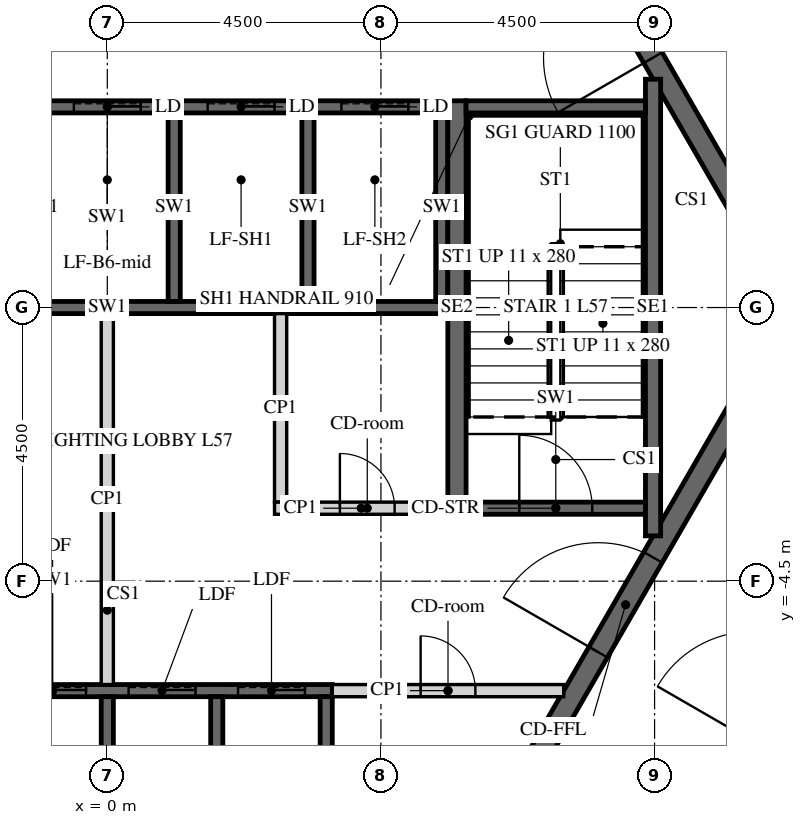
"""IFC4 building model, lengths in metres.
Left out: names, types, materials, properties, quantities, classifications, styles, units other than length and angle.
Written with IfcOpenShell. Run it as: python <this file> out.ifc"""

import sys

from ifc_helpers import new_model, si_unit, direction, frame, frame_2d, origin, place, context, subcontext, project, spatial, polyline, rectangle, outline, extrude, element, fill, save


model = new_model("IFC4")
c1 = context("Model", 3, precision=1e-05, world=origin(), true_north=direction((0.0, 1.0)))
c2 = subcontext(c1, "Body", "Model", "MODEL_VIEW")
j1 = project(units=[si_unit("LENGTHUNIT", "METRE"), si_unit("PLANEANGLEUNIT", "RADIAN")], contexts=[c1])
p1 = place(None, origin())
s1 = spatial("IfcSite", under=j1, at=p1, CompositionType="ELEMENT")
p2 = place(p1, origin())
s2 = spatial("IfcBuilding", under=s1, at=p2, CompositionType="ELEMENT")
p3 = place(p2, frame((0.0, 0.0, 238.5)))
s3 = spatial("IfcBuildingStorey", under=s2, at=p3, CompositionType="ELEMENT", Elevation=238.5)
p4 = place(p3, frame((7.361, -12.75, -0.15), z_axis=(0.0, 0.0, 1.0), x_axis=(0.50000571537, 0.866022103989, 0.0)))
e1 = element("IfcWall", 1, at=p4, inside=s3, PredefinedType="SHEAR", context=c2, shape_type="SweptSolid", body=[
    extrude(outline(polyline([(-0.144, -0.25), (14.867, -0.25), (14.578, 0.25), (0.144, 0.25), (-0.144, -0.25)])), origin(), (0.0, 0.0, 1.0), 3.9),
])
p5 = place(p4, frame((6.49, 0.0, 0.15)))
e2 = element("IfcOpeningElement", 2, at=p5, cuts=e1, PredefinedType="OPENING", context=c2, shape_type="SweptSolid", body=[
    extrude(rectangle(XDim=1.8, YDim=2.4, at=frame_2d((0.9, 1.2))), frame((0.0, 0.26, 0.0), z_axis=(0.0, -1.0, 0.0), x_axis=(1.0, 0.0, 0.0)), (0.0, 0.0, 1.0), 0.52),
])
p6 = place(p3, frame((14.722, 0.0, -0.15), z_axis=(0.0, 0.0, 1.0), x_axis=(-0.50000571537, 0.866022103989, 0.0)))
e3 = element("IfcWall", 3, at=p6, inside=s3, PredefinedType="SHEAR", context=c2, shape_type="SweptSolid", body=[
    extrude(outline(polyline([(-0.144, -0.25), (14.867, -0.25), (14.578, 0.25), (0.144, 0.25), (-0.144, -0.25)])), origin(), (0.0, 0.0, 1.0), 3.9),
])
p7 = place(p6, frame((6.432, 0.0, 0.15)))
e4 = element("IfcOpeningElement", 4, at=p7, cuts=e3, PredefinedType="OPENING", context=c2, shape_type="SweptSolid", body=[
    extrude(rectangle(XDim=1.8, YDim=2.4, at=frame_2d((0.9, 1.2))), frame((0.0, 0.26, 0.0), z_axis=(0.0, -1.0, 0.0), x_axis=(1.0, 0.0, 0.0)), (0.0, 0.0, 1.0), 0.52),
])
p8 = place(p3, frame((5.673, -9.825, -0.15), z_axis=(0.0, 0.0, 1.0), x_axis=(0.499995046907, 0.866028263435, 0.0)))
e5 = element("IfcWall", 5, at=p8, inside=s3, PredefinedType="SHEAR", context=c2, shape_type="SweptSolid", body=[
    extrude(outline(polyline([(-0.101, -0.175), (11.446, -0.175), (11.244, 0.175), (0.101, 0.175), (-0.101, -0.175)])), origin(), (0.0, 0.0, 1.0), 3.9),
])
p9 = place(p8, frame((4.801, 0.0, 0.15)))
e6 = element("IfcOpeningElement", 6, at=p9, cuts=e5, PredefinedType="OPENING", context=c2, shape_type="SweptSolid", body=[
    extrude(rectangle(XDim=1.8, YDim=2.4, at=frame_2d((0.9, 1.2))), frame((0.0, 0.185, 0.0), z_axis=(0.0, -1.0, 0.0), x_axis=(1.0, 0.0, 0.0)), (0.0, 0.0, 1.0), 0.37),
])
p10 = place(p3, frame((11.345, 0.0, -0.15), z_axis=(0.0, 0.0, 1.0), x_axis=(-0.499995046907, 0.866028263435, 0.0)))
e7 = element("IfcWall", 7, at=p10, inside=s3, PredefinedType="SHEAR", context=c2, shape_type="SweptSolid", body=[
    extrude(outline(polyline([(-0.101, -0.175), (11.446, -0.175), (11.244, 0.175), (0.101, 0.175), (-0.101, -0.175)])), origin(), (0.0, 0.0, 1.0), 3.9),
])
p11 = place(p10, frame((4.744, 0.0, 0.15)))
e8 = element("IfcOpeningElement", 8, at=p11, cuts=e7, PredefinedType="OPENING", context=c2, shape_type="SweptSolid", body=[
    extrude(rectangle(XDim=1.8, YDim=2.4, at=frame_2d((0.9, 1.2))), frame((0.0, 0.185, 0.0), z_axis=(0.0, -1.0, 0.0), x_axis=(1.0, 0.0, 0.0)), (0.0, 0.0, 1.0), 0.37),
])
p12 = place(p3, frame((-5.6, 3.3, -0.25), z_axis=(0.0, 0.0, 1.0), x_axis=(1.0, 0.0, 0.0)))
e9 = element("IfcWall", 9, at=p12, inside=s3, PredefinedType="SHEAR", context=c2, shape_type="SweptSolid", body=[
    extrude(rectangle(XDim=11.2, YDim=0.2, at=frame_2d((5.6, 0.0))), origin(), (0.0, 0.0, 1.0), 3.9),
])
p13 = place(p12, frame((0.65, 0.0, 0.25)))
e10 = element("IfcOpeningElement", 10, at=p13, cuts=e9, PredefinedType="OPENING", context=c2, shape_type="SweptSolid", body=[
    extrude(rectangle(XDim=1.1, YDim=2.1, at=frame_2d((0.55, 1.05))), frame((0.0, 0.11, 0.0), z_axis=(0.0, -1.0, 0.0), x_axis=(1.0, 0.0, 0.0)), (0.0, 0.0, 1.0), 0.22),
])
p14 = place(p12, frame((2.85, 0.0, 0.25)))
e11 = element("IfcOpeningElement", 11, at=p14, cuts=e9, PredefinedType="OPENING", context=c2, shape_type="SweptSolid", body=[
    extrude(rectangle(XDim=1.1, YDim=2.1, at=frame_2d((0.55, 1.05))), frame((0.0, 0.11, 0.0), z_axis=(0.0, -1.0, 0.0), x_axis=(1.0, 0.0, 0.0)), (0.0, 0.0, 1.0), 0.22),
])
p15 = place(p12, frame((5.05, 0.0, 0.25)))
e12 = element("IfcOpeningElement", 12, at=p15, cuts=e9, PredefinedType="OPENING", context=c2, shape_type="SweptSolid", body=[
    extrude(rectangle(XDim=1.1, YDim=2.1, at=frame_2d((0.55, 1.05))), frame((0.0, 0.11, 0.0), z_axis=(0.0, -1.0, 0.0), x_axis=(1.0, 0.0, 0.0)), (0.0, 0.0, 1.0), 0.22),
])
p16 = place(p12, frame((7.25, 0.0, 0.25)))
e13 = element("IfcOpeningElement", 13, at=p16, cuts=e9, PredefinedType="OPENING", context=c2, shape_type="SweptSolid", body=[
    extrude(rectangle(XDim=1.1, YDim=2.1, at=frame_2d((0.55, 1.05))), frame((0.0, 0.11, 0.0), z_axis=(0.0, -1.0, 0.0), x_axis=(1.0, 0.0, 0.0)), (0.0, 0.0, 1.0), 0.22),
])
p17 = place(p12, frame((9.45, 0.0, 0.25)))
e14 = element("IfcOpeningElement", 14, at=p17, cuts=e9, PredefinedType="OPENING", context=c2, shape_type="SweptSolid", body=[
    extrude(rectangle(XDim=1.1, YDim=2.1, at=frame_2d((0.55, 1.05))), frame((0.0, 0.11, 0.0), z_axis=(0.0, -1.0, 0.0), x_axis=(1.0, 0.0, 0.0)), (0.0, 0.0, 1.0), 0.22),
])
p18 = place(p3, frame((-5.6, 0.0, -0.25), z_axis=(0.0, 0.0, 1.0), x_axis=(1.0, 0.0, 0.0)))
e15 = element("IfcWall", 15, at=p18, inside=s3, PredefinedType="SHEAR", context=c2, shape_type="SweptSolid", body=[
    extrude(rectangle(XDim=11.2, YDim=0.2, at=frame_2d((5.6, 0.0))), origin(), (0.0, 0.0, 1.0), 3.9),
])
for number, where, z_axis, x_axis in (
    (16, (1.1, 0.1, -0.25), (0.0, 0.0, 1.0), (0.0, 1.0, 0.0)),
    (17, (3.3, 0.1, -0.25), (0.0, 0.0, 1.0), (0.0, 1.0, 0.0)),
    (18, (5.5, 0.1, -0.25), (0.0, 0.0, 1.0), (0.0, 1.0, 0.0)),
):
    element("IfcWall", number, at=place(p3, frame(where, z_axis=z_axis, x_axis=x_axis)), inside=s3, PredefinedType="SHEAR", context=c2, shape_type="SweptSolid", body=[
        extrude(rectangle(XDim=3.1, YDim=0.2, at=frame_2d((1.55, 0.0))), origin(), (0.0, 0.0, 1.0), 3.9),
    ])
p19 = place(p3, frame((-5.5, -6.3, -0.25), z_axis=(0.0, 0.0, 1.0), x_axis=(1.0, 0.0, 0.0)))
e19 = element("IfcWall", 19, at=p19, inside=s3, PredefinedType="SHEAR", context=c2, shape_type="SweptSolid", body=[
    extrude(rectangle(XDim=9.2, YDim=0.2, at=frame_2d((4.6, 0.0))), origin(), (0.0, 0.0, 1.0), 3.9),
])
p20 = place(p19, frame((0.45, 0.0, 0.25)))
e20 = element("IfcOpeningElement", 20, at=p20, cuts=e19, PredefinedType="OPENING", context=c2, shape_type="SweptSolid", body=[
    extrude(rectangle(XDim=1.1, YDim=2.1, at=frame_2d((0.55, 1.05))), frame((0.0, 0.11, 0.0), z_axis=(0.0, -1.0, 0.0), x_axis=(1.0, 0.0, 0.0)), (0.0, 0.0, 1.0), 0.22),
])
p21 = place(p19, frame((2.25, 0.0, 0.25)))
e21 = element("IfcOpeningElement", 21, at=p21, cuts=e19, PredefinedType="OPENING", context=c2, shape_type="SweptSolid", body=[
    extrude(rectangle(XDim=1.1, YDim=2.1, at=frame_2d((0.55, 1.05))), frame((0.0, 0.11, 0.0), z_axis=(0.0, -1.0, 0.0), x_axis=(1.0, 0.0, 0.0)), (0.0, 0.0, 1.0), 0.22),
])
p22 = place(p19, frame((4.05, 0.0, 0.25)))
e22 = element("IfcOpeningElement", 22, at=p22, cuts=e19, PredefinedType="OPENING", context=c2, shape_type="SweptSolid", body=[
    extrude(rectangle(XDim=1.1, YDim=2.1, at=frame_2d((0.55, 1.05))), frame((0.0, 0.11, 0.0), z_axis=(0.0, -1.0, 0.0), x_axis=(1.0, 0.0, 0.0)), (0.0, 0.0, 1.0), 0.22),
])
p23 = place(p19, frame((5.85, 0.0, 0.25)))
e23 = element("IfcOpeningElement", 23, at=p23, cuts=e19, PredefinedType="OPENING", context=c2, shape_type="SweptSolid", body=[
    extrude(rectangle(XDim=1.1, YDim=2.1, at=frame_2d((0.55, 1.05))), frame((0.0, 0.11, 0.0), z_axis=(0.0, -1.0, 0.0), x_axis=(1.0, 0.0, 0.0)), (0.0, 0.0, 1.0), 0.22),
])
p24 = place(p19, frame((7.65, 0.0, 0.25)))
e24 = element("IfcOpeningElement", 24, at=p24, cuts=e19, PredefinedType="OPENING", context=c2, shape_type="SweptSolid", body=[
    extrude(rectangle(XDim=1.1, YDim=2.1, at=frame_2d((0.55, 1.05))), frame((0.0, 0.11, 0.0), z_axis=(0.0, -1.0, 0.0), x_axis=(1.0, 0.0, 0.0)), (0.0, 0.0, 1.0), 0.22),
])
for number, where, z_axis, x_axis in (
    (25, (0.0, -9.3, -0.25), (0.0, 0.0, 1.0), (0.0, 1.0, 0.0)),
    (26, (1.8, -9.3, -0.25), (0.0, 0.0, 1.0), (0.0, 1.0, 0.0)),
    (27, (3.6, -9.3, -0.25), (0.0, 0.0, 1.0), (0.0, 1.0, 0.0)),
):
    element("IfcWall", number, at=place(p3, frame(where, z_axis=z_axis, x_axis=x_axis)), inside=s3, PredefinedType="SHEAR", context=c2, shape_type="SweptSolid", body=[
        extrude(rectangle(XDim=2.9, YDim=0.2, at=frame_2d((1.45, 0.0))), origin(), (0.0, 0.0, 1.0), 3.9),
    ])
p25 = place(p3, frame((2.75, -3.3, 0.0), z_axis=(0.0, 0.0, 1.0), x_axis=(1.0, 0.0, 0.0)))
e28 = element("IfcWall", 28, at=p25, inside=s3, PredefinedType="PARTITIONING", context=c2, shape_type="SweptSolid", body=[
    extrude(rectangle(XDim=2.85, YDim=0.2, at=frame_2d((1.425, 0.0))), origin(), (0.0, 0.0, 1.0), 3.65),
])
p26 = place(p25, frame((1.075, 0.0, 0.0)))
e29 = element("IfcOpeningElement", 29, at=p26, cuts=e28, PredefinedType="OPENING", context=c2, shape_type="SweptSolid", body=[
    extrude(rectangle(XDim=0.9, YDim=2.1, at=frame_2d((0.45, 1.05))), frame((0.0, 0.11, 0.0), z_axis=(0.0, -1.0, 0.0), x_axis=(1.0, 0.0, 0.0)), (0.0, 0.0, 1.0), 0.22),
])
p27 = place(p3, frame((2.85, -3.2, 0.0), z_axis=(0.0, 0.0, 1.0), x_axis=(0.0, 1.0, 0.0)))
e30 = element("IfcWall", 30, at=p27, inside=s3, PredefinedType="PARTITIONING", context=c2, shape_type="SweptSolid", body=[
    extrude(rectangle(XDim=3.1, YDim=0.2, at=frame_2d((1.55, 0.0))), origin(), (0.0, 0.0, 1.0), 3.65),
])
p28 = place(p3, frame((0.0, -6.2, 0.0), z_axis=(0.0, 0.0, 1.0), x_axis=(0.0, 1.0, 0.0)))
e31 = element("IfcWall", 31, at=p28, inside=s3, PredefinedType="PARTITIONING", context=c2, shape_type="SweptSolid", body=[
    extrude(rectangle(XDim=6.1, YDim=0.2, at=frame_2d((3.05, 0.0))), origin(), (0.0, 0.0, 1.0), 3.65),
])
p29 = place(p3, frame((3.7, -6.3, 0.0), z_axis=(0.0, 0.0, 1.0), x_axis=(1.0, 0.0, 0.0)))
e32 = element("IfcWall", 32, at=p29, inside=s3, PredefinedType="PARTITIONING", context=c2, shape_type="SweptSolid", body=[
    extrude(rectangle(XDim=3.806, YDim=0.2, at=frame_2d((1.903, 0.0))), origin(), (0.0, 0.0, 1.0), 3.65),
])
p30 = place(p29, frame((1.453, 0.0, 0.0)))
e33 = element("IfcOpeningElement", 33, at=p30, cuts=e32, PredefinedType="OPENING", context=c2, shape_type="SweptSolid", body=[
    extrude(rectangle(XDim=0.9, YDim=2.1, at=frame_2d((0.45, 1.05))), frame((0.0, 0.11, 0.0), z_axis=(0.0, -1.0, 0.0), x_axis=(1.0, 0.0, 0.0)), (0.0, 0.0, 1.0), 0.22),
])
p31 = place(p3, frame((5.75, -3.4, -0.25), z_axis=(0.0, 0.0, 1.0), x_axis=(0.0, 1.0, 0.0)))
e34 = element("IfcWall", 34, at=p31, inside=s3, PredefinedType="SHEAR", context=c2, shape_type="SweptSolid", body=[
    extrude(rectangle(XDim=6.8, YDim=0.3, at=frame_2d((3.4, 0.0))), origin(), (0.0, 0.0, 1.0), 3.9),
])
p32 = place(p3, frame((8.975, -3.755, -0.25), z_axis=(0.0, 0.0, 1.0), x_axis=(0.0, 1.0, 0.0)))
e35 = element("IfcWall", 35, at=p32, inside=s3, PredefinedType="SHEAR", context=c2, shape_type="SweptSolid", body=[
    extrude(rectangle(XDim=7.51, YDim=0.25, at=frame_2d((3.755, 0.0))), origin(), (0.0, 0.0, 1.0), 3.9),
])
p33 = place(p3, frame((5.9, 3.3, -0.25), z_axis=(0.0, 0.0, 1.0), x_axis=(1.0, 0.0, 0.0)))
e36 = element("IfcWall", 36, at=p33, inside=s3, PredefinedType="SHEAR", context=c2, shape_type="SweptSolid", body=[
    extrude(rectangle(XDim=2.95, YDim=0.2, at=frame_2d((1.475, 0.0))), origin(), (0.0, 0.0, 1.0), 3.9),
])
p34 = place(p3, frame((5.9, -3.3, -0.25), z_axis=(0.0, 0.0, 1.0), x_axis=(1.0, 0.0, 0.0)))
e37 = element("IfcWall", 37, at=p34, inside=s3, PredefinedType="SHEAR", context=c2, shape_type="SweptSolid", body=[
    extrude(rectangle(XDim=2.95, YDim=0.2, at=frame_2d((1.475, 0.0))), origin(), (0.0, 0.0, 1.0), 3.9),
])
p35 = place(p34, frame((0.875, 0.0, 0.25)))
e38 = element("IfcOpeningElement", 38, at=p35, cuts=e37, PredefinedType="OPENING", context=c2, shape_type="SweptSolid", body=[
    extrude(rectangle(XDim=1.2, YDim=2.4, at=frame_2d((0.6, 1.2))), frame((0.0, 0.11, 0.0), z_axis=(0.0, -1.0, 0.0), x_axis=(1.0, 0.0, 0.0)), (0.0, 0.0, 1.0), 0.22),
])
p36 = place(p3, frame((9.887, -12.875, 0.0), z_axis=(0.0, 0.0, 1.0), x_axis=(0.499998228944, 0.866026426302, 0.0)))
e39 = element("IfcWall", 39, at=p36, inside=s3, PredefinedType="PARTITIONING", context=c2, shape_type="SweptSolid", body=[
    extrude(rectangle(XDim=14.867, YDim=0.15, at=frame_2d((7.433, 0.0))), origin(), (0.0, 0.0, 1.0), 2.838),
])
p37 = place(p36, frame((3.519, 0.0, 0.0)))
e40 = element("IfcOpeningElement", 40, at=p37, cuts=e39, PredefinedType="OPENING", context=c2, shape_type="SweptSolid", body=[
    extrude(rectangle(XDim=1.0, YDim=2.1, at=frame_2d((0.5, 1.05))), frame((0.0, 0.085, 0.0), z_axis=(0.0, -1.0, 0.0), x_axis=(1.0, 0.0, 0.0)), (0.0, 0.0, 1.0), 0.17),
])
p38 = place(p36, frame((7.324, 0.0, 0.0)))
e41 = element("IfcOpeningElement", 41, at=p38, cuts=e39, PredefinedType="OPENING", context=c2, shape_type="SweptSolid", body=[
    extrude(rectangle(XDim=1.0, YDim=2.1, at=frame_2d((0.5, 1.05))), frame((0.0, 0.085, 0.0), z_axis=(0.0, -1.0, 0.0), x_axis=(1.0, 0.0, 0.0)), (0.0, 0.0, 1.0), 0.17),
])
p39 = place(p36, frame((13.717, 0.0, 0.0)))
e42 = element("IfcOpeningElement", 42, at=p39, cuts=e39, PredefinedType="OPENING", context=c2, shape_type="SweptSolid", body=[
    extrude(rectangle(XDim=1.0, YDim=2.1, at=frame_2d((0.5, 1.05))), frame((0.0, 0.085, 0.0), z_axis=(0.0, -1.0, 0.0), x_axis=(1.0, 0.0, 0.0)), (0.0, 0.0, 1.0), 0.17),
])
p40 = place(p3, frame((17.277, 0.075, 0.0), z_axis=(0.0, 0.0, 1.0), x_axis=(-0.499998228944, 0.866026426302, 0.0)))
e43 = element("IfcWall", 43, at=p40, inside=s3, PredefinedType="PARTITIONING", context=c2, shape_type="SweptSolid", body=[
    extrude(rectangle(XDim=14.867, YDim=0.15, at=frame_2d((7.433, 0.0))), origin(), (0.0, 0.0, 1.0), 2.838),
])
p41 = place(p40, frame((4.345, 0.0, 0.0)))
e44 = element("IfcOpeningElement", 44, at=p41, cuts=e43, PredefinedType="OPENING", context=c2, shape_type="SweptSolid", body=[
    extrude(rectangle(XDim=1.0, YDim=2.1, at=frame_2d((0.5, 1.05))), frame((0.0, 0.085, 0.0), z_axis=(0.0, -1.0, 0.0), x_axis=(1.0, 0.0, 0.0)), (0.0, 0.0, 1.0), 0.17),
])
p42 = place(p40, frame((8.51, 0.0, 0.0)))
e45 = element("IfcOpeningElement", 45, at=p42, cuts=e43, PredefinedType="OPENING", context=c2, shape_type="SweptSolid", body=[
    extrude(rectangle(XDim=1.0, YDim=2.1, at=frame_2d((0.5, 1.05))), frame((0.0, 0.085, 0.0), z_axis=(0.0, -1.0, 0.0), x_axis=(1.0, 0.0, 0.0)), (0.0, 0.0, 1.0), 0.17),
])
p43 = place(p11, origin())
e46 = element("IfcDoor", 46, at=p43, inside=s3, OperationType="DOUBLE_DOOR_SINGLE_SWING", PredefinedType="DOOR", context=c2, shape_type="SweptSolid", body=[
    extrude(rectangle(XDim=1.8, YDim=2.4, at=frame_2d((0.9, 1.2))), frame((0.0, 0.025, 0.0), z_axis=(0.0, -1.0, 0.0), x_axis=(1.0, 0.0, 0.0)), (0.0, 0.0, 1.0), 0.05),
])
fill(e8, e46)
p44 = place(p9, origin())
e47 = element("IfcDoor", 47, at=p44, inside=s3, OperationType="DOUBLE_DOOR_SINGLE_SWING", PredefinedType="DOOR", context=c2, shape_type="SweptSolid", body=[
    extrude(rectangle(XDim=1.8, YDim=2.4, at=frame_2d((0.9, 1.2))), frame((0.0, 0.025, 0.0), z_axis=(0.0, -1.0, 0.0), x_axis=(1.0, 0.0, 0.0)), (0.0, 0.0, 1.0), 0.05),
])
fill(e6, e47)
p45 = place(p26, origin())
e48 = element("IfcDoor", 48, at=p45, inside=s3, OperationType="SINGLE_SWING_LEFT", PredefinedType="DOOR", context=c2, shape_type="SweptSolid", body=[
    extrude(rectangle(XDim=0.9, YDim=2.1, at=frame_2d((0.45, 1.05))), frame((0.0, 0.025, 0.0), z_axis=(0.0, -1.0, 0.0), x_axis=(1.0, 0.0, 0.0)), (0.0, 0.0, 1.0), 0.05),
])
fill(e29, e48)
p46 = place(p30, origin())
e49 = element("IfcDoor", 49, at=p46, inside=s3, OperationType="SINGLE_SWING_LEFT", PredefinedType="DOOR", context=c2, shape_type="SweptSolid", body=[
    extrude(rectangle(XDim=0.9, YDim=2.1, at=frame_2d((0.45, 1.05))), frame((0.0, 0.025, 0.0), z_axis=(0.0, -1.0, 0.0), x_axis=(1.0, 0.0, 0.0)), (0.0, 0.0, 1.0), 0.05),
])
fill(e33, e49)
p47 = place(p35, origin())
e50 = element("IfcDoor", 50, at=p47, inside=s3, OperationType="SINGLE_SWING_LEFT", PredefinedType="DOOR", context=c2, shape_type="SweptSolid", body=[
    extrude(rectangle(XDim=1.2, YDim=2.4, at=frame_2d((0.6, 1.2))), frame((0.0, 0.025, 0.0), z_axis=(0.0, -1.0, 0.0), x_axis=(1.0, 0.0, 0.0)), (0.0, 0.0, 1.0), 0.05),
])
fill(e38, e50)
p48 = place(p15, origin())
e51 = element("IfcDoor", 51, at=p48, inside=s3, OperationType="SLIDING_TO_LEFT", PredefinedType="DOOR", context=c2, shape_type="SweptSolid", body=[
    extrude(rectangle(XDim=1.1, YDim=2.1, at=frame_2d((0.55, 1.05))), frame((0.0, 0.025, 0.0), z_axis=(0.0, -1.0, 0.0), x_axis=(1.0, 0.0, 0.0)), (0.0, 0.0, 1.0), 0.05),
])
fill(e12, e51)
p49 = place(p16, origin())
e52 = element("IfcDoor", 52, at=p49, inside=s3, OperationType="SLIDING_TO_LEFT", PredefinedType="DOOR", context=c2, shape_type="SweptSolid", body=[
    extrude(rectangle(XDim=1.1, YDim=2.1, at=frame_2d((0.55, 1.05))), frame((0.0, 0.025, 0.0), z_axis=(0.0, -1.0, 0.0), x_axis=(1.0, 0.0, 0.0)), (0.0, 0.0, 1.0), 0.05),
])
fill(e13, e52)
p50 = place(p17, origin())
e53 = element("IfcDoor", 53, at=p50, inside=s3, OperationType="SLIDING_TO_LEFT", PredefinedType="DOOR", context=c2, shape_type="SweptSolid", body=[
    extrude(rectangle(XDim=1.1, YDim=2.1, at=frame_2d((0.55, 1.05))), frame((0.0, 0.025, 0.0), z_axis=(0.0, -1.0, 0.0), x_axis=(1.0, 0.0, 0.0)), (0.0, 0.0, 1.0), 0.05),
])
fill(e14, e53)
p51 = place(p22, origin())
e54 = element("IfcDoor", 54, at=p51, inside=s3, OperationType="SLIDING_TO_LEFT", PredefinedType="DOOR", context=c2, shape_type="SweptSolid", body=[
    extrude(rectangle(XDim=1.1, YDim=2.1, at=frame_2d((0.55, 1.05))), frame((0.0, 0.025, 0.0), z_axis=(0.0, -1.0, 0.0), x_axis=(1.0, 0.0, 0.0)), (0.0, 0.0, 1.0), 0.05),
])
fill(e22, e54)
p52 = place(p23, origin())
e55 = element("IfcDoor", 55, at=p52, inside=s3, OperationType="SLIDING_TO_LEFT", PredefinedType="DOOR", context=c2, shape_type="SweptSolid", body=[
    extrude(rectangle(XDim=1.1, YDim=2.1, at=frame_2d((0.55, 1.05))), frame((0.0, 0.025, 0.0), z_axis=(0.0, -1.0, 0.0), x_axis=(1.0, 0.0, 0.0)), (0.0, 0.0, 1.0), 0.05),
])
fill(e23, e55)
p53 = place(p24, origin())
e56 = element("IfcDoor", 56, at=p53, inside=s3, OperationType="SLIDING_TO_LEFT", PredefinedType="DOOR", context=c2, shape_type="SweptSolid", body=[
    extrude(rectangle(XDim=1.1, YDim=2.1, at=frame_2d((0.55, 1.05))), frame((0.0, 0.025, 0.0), z_axis=(0.0, -1.0, 0.0), x_axis=(1.0, 0.0, 0.0)), (0.0, 0.0, 1.0), 0.05),
])
fill(e24, e56)
save(model, sys.argv[1])
